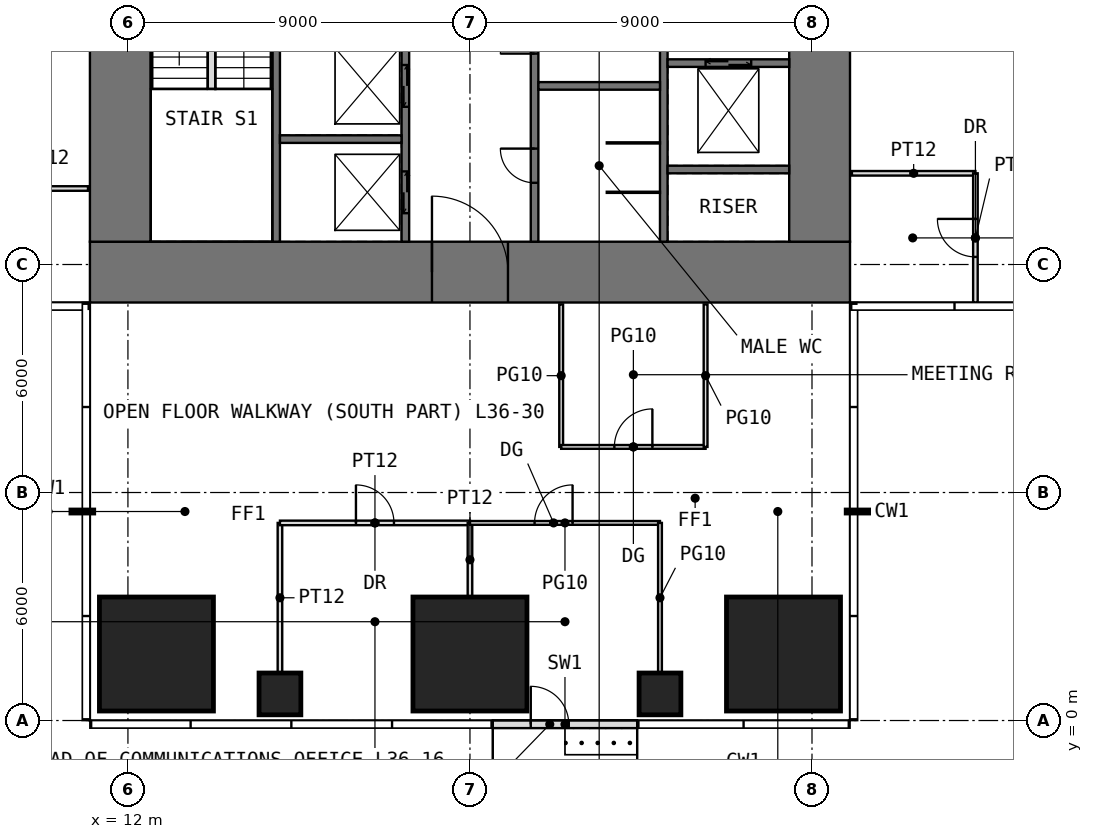
"""IFC4 building model, lengths in metres.
Left out: names, types, materials, properties, quantities, classifications, styles, units other than length and angle.
Written with IfcOpenShell. Run it as: python <this file> out.ifc"""

import sys

from ifc_helpers import new_model, si_unit, direction, frame, frame_2d, origin, origin_2d, place, context, subcontext, project, spatial, rectangle, extrude, element, fill, save


model = new_model("IFC4")
c1 = context("Model", 3, precision=1e-05, world=origin(), true_north=direction((0.0, 1.0)))
c2 = subcontext(c1, "Body", "Model", "MODEL_VIEW")
j1 = project(units=[si_unit("LENGTHUNIT", "METRE"), si_unit("PLANEANGLEUNIT", "RADIAN")], contexts=[c1])
p1 = place(None, origin())
s1 = spatial("IfcSite", under=j1, at=p1, CompositionType="ELEMENT")
p2 = place(p1, origin())
s2 = spatial("IfcBuilding", under=s1, at=p2, CompositionType="ELEMENT")
p3 = place(p2, frame((0.0, 0.0, 152.5)))
s3 = spatial("IfcBuildingStorey", under=s2, at=p3, CompositionType="ELEMENT", Elevation=152.5)
p4 = place(p3, frame((12.75, 1.75, 0.0), z_axis=(0.0, 0.0, 1.0), x_axis=(1.0, 0.0, 0.0)))
e1 = element("IfcColumn", 1, at=p4, inside=s3, PredefinedType="COLUMN", context=c2, shape_type="SweptSolid", body=[
    extrude(rectangle(XDim=3.0, YDim=3.0, at=origin_2d()), origin(), (0.0, 0.0, 1.0), 4.0),
])
p5 = place(p3, frame((16.0, 0.7, 0.0), z_axis=(0.0, 0.0, 1.0), x_axis=(1.0, 0.0, 0.0)))
e2 = element("IfcColumn", 2, at=p5, inside=s3, PredefinedType="COLUMN", context=c2, shape_type="SweptSolid", body=[
    extrude(rectangle(XDim=1.1, YDim=1.1, at=origin_2d()), origin(), (0.0, 0.0, 1.0), 4.0),
])
p6 = place(p3, frame((21.0, 1.75, 0.0), z_axis=(0.0, 0.0, 1.0), x_axis=(1.0, 0.0, 0.0)))
e3 = element("IfcColumn", 3, at=p6, inside=s3, PredefinedType="COLUMN", context=c2, shape_type="SweptSolid", body=[
    extrude(rectangle(XDim=3.0, YDim=3.0, at=origin_2d()), origin(), (0.0, 0.0, 1.0), 4.0),
])
p7 = place(p3, frame((26.0, 0.7, 0.0), z_axis=(0.0, 0.0, 1.0), x_axis=(1.0, 0.0, 0.0)))
e4 = element("IfcColumn", 4, at=p7, inside=s3, PredefinedType="COLUMN", context=c2, shape_type="SweptSolid", body=[
    extrude(rectangle(XDim=1.1, YDim=1.1, at=origin_2d()), origin(), (0.0, 0.0, 1.0), 4.0),
])
p8 = place(p3, frame((29.25, 1.75, 0.0), z_axis=(0.0, 0.0, 1.0), x_axis=(1.0, 0.0, 0.0)))
e5 = element("IfcColumn", 5, at=p8, inside=s3, PredefinedType="COLUMN", context=c2, shape_type="SweptSolid", body=[
    extrude(rectangle(XDim=3.0, YDim=3.0, at=origin_2d()), origin(), (0.0, 0.0, 1.0), 4.0),
])
p9 = place(p3, frame((21.6, -0.1, 0.0), z_axis=(0.0, 0.0, 1.0), x_axis=(1.0, 0.0, 0.0)))
e6 = element("IfcWall", 6, at=p9, inside=s3, PredefinedType="USERDEFINED", context=c2, shape_type="SweptSolid", body=[
    extrude(rectangle(XDim=3.8, YDim=0.2, at=frame_2d((1.9, 0.0))), origin(), (0.0, 0.0, 1.0), 3.75),
])
p10 = place(p9, frame((1.0, 0.0, 0.0)))
e7 = element("IfcOpeningElement", 7, at=p10, cuts=e6, PredefinedType="OPENING", context=c2, shape_type="SweptSolid", body=[
    extrude(rectangle(XDim=1.0, YDim=2.4, at=frame_2d((0.5, 1.2))), frame((0.0, 0.11, 0.0), z_axis=(0.0, -1.0, 0.0), x_axis=(1.0, 0.0, 0.0)), (0.0, 0.0, 1.0), 0.22),
])
p11 = place(p3, frame((11.0, 11.8, -0.05), z_axis=(0.0, 0.0, 1.0), x_axis=(1.0, 0.0, 0.0)))
e8 = element("IfcWall", 8, at=p11, inside=s3, PredefinedType="SHEAR", context=c2, shape_type="SweptSolid", body=[
    extrude(rectangle(XDim=20.0, YDim=1.6, at=frame_2d((10.0, 0.0))), origin(), (0.0, 0.0, 1.0), 4.0),
])
p12 = place(p11, frame((9.0, 0.0, 0.05)))
e9 = element("IfcOpeningElement", 9, at=p12, cuts=e8, PredefinedType="OPENING", context=c2, shape_type="SweptSolid", body=[
    extrude(rectangle(XDim=2.0, YDim=2.2, at=frame_2d((1.0, 1.1))), frame((0.0, 0.81, 0.0), z_axis=(0.0, -1.0, 0.0), x_axis=(1.0, 0.0, 0.0)), (0.0, 0.0, 1.0), 1.62),
])
p13 = place(p3, frame((11.8, 12.6, -0.05), z_axis=(0.0, 0.0, 1.0), x_axis=(0.0, 1.0, 0.0)))
e10 = element("IfcWall", 10, at=p13, inside=s3, PredefinedType="SHEAR", context=c2, shape_type="SweptSolid", body=[
    extrude(rectangle(XDim=16.8, YDim=1.6, at=frame_2d((8.4, 0.0))), origin(), (0.0, 0.0, 1.0), 4.0),
])
p14 = place(p13, frame((9.9, 0.0, 0.05)))
e11 = element("IfcOpeningElement", 11, at=p14, cuts=e10, PredefinedType="OPENING", context=c2, shape_type="SweptSolid", body=[
    extrude(rectangle(XDim=1.0, YDim=2.2, at=frame_2d((0.5, 1.1))), frame((0.0, 0.81, 0.0), z_axis=(0.0, -1.0, 0.0), x_axis=(1.0, 0.0, 0.0)), (0.0, 0.0, 1.0), 1.62),
])
p15 = place(p3, frame((30.2, 12.6, -0.05), z_axis=(0.0, 0.0, 1.0), x_axis=(0.0, 1.0, 0.0)))
e12 = element("IfcWall", 12, at=p15, inside=s3, PredefinedType="SHEAR", context=c2, shape_type="SweptSolid", body=[
    extrude(rectangle(XDim=16.8, YDim=1.6, at=frame_2d((8.4, 0.0))), origin(), (0.0, 0.0, 1.0), 4.0),
])
p16 = place(p15, frame((5.9, 0.0, 0.05)))
e13 = element("IfcOpeningElement", 13, at=p16, cuts=e12, PredefinedType="OPENING", context=c2, shape_type="SweptSolid", body=[
    extrude(rectangle(XDim=1.0, YDim=2.2, at=frame_2d((0.5, 1.1))), frame((0.0, 0.81, 0.0), z_axis=(0.0, -1.0, 0.0), x_axis=(1.0, 0.0, 0.0)), (0.0, 0.0, 1.0), 1.62),
])
p17 = place(p3, frame((15.9, 12.6, -0.05), z_axis=(0.0, 0.0, 1.0), x_axis=(0.0, 1.0, 0.0)))
e14 = element("IfcWall", 14, at=p17, inside=s3, PredefinedType="SHEAR", context=c2, shape_type="SweptSolid", body=[
    extrude(rectangle(XDim=16.8, YDim=0.2, at=frame_2d((8.4, 0.0))), origin(), (0.0, 0.0, 1.0), 4.0),
])
p18 = place(p17, frame((8.9, 0.0, 0.05)))
e15 = element("IfcOpeningElement", 15, at=p18, cuts=e14, PredefinedType="OPENING", context=c2, shape_type="SweptSolid", body=[
    extrude(rectangle(XDim=1.0, YDim=2.2, at=frame_2d((0.5, 1.1))), frame((0.0, 0.11, 0.0), z_axis=(0.0, -1.0, 0.0), x_axis=(1.0, 0.0, 0.0)), (0.0, 0.0, 1.0), 0.22),
])
p19 = place(p3, frame((19.3, 12.6, -0.05), z_axis=(0.0, 0.0, 1.0), x_axis=(0.0, 1.0, 0.0)))
e16 = element("IfcWall", 16, at=p19, inside=s3, PredefinedType="SHEAR", context=c2, shape_type="SweptSolid", body=[
    extrude(rectangle(XDim=16.8, YDim=0.2, at=frame_2d((8.4, 0.0))), origin(), (0.0, 0.0, 1.0), 4.0),
])
p20 = place(p19, frame((8.7, 0.0, 0.05)))
e17 = element("IfcOpeningElement", 17, at=p20, cuts=e16, PredefinedType="OPENING", context=c2, shape_type="SweptSolid", body=[
    extrude(rectangle(XDim=1.0, YDim=2.2, at=frame_2d((0.5, 1.1))), frame((0.0, 0.11, 0.0), z_axis=(0.0, -1.0, 0.0), x_axis=(1.0, 0.0, 0.0)), (0.0, 0.0, 1.0), 0.22),
])
p21 = place(p19, frame((10.85, 0.0, 0.05)))
e18 = element("IfcOpeningElement", 18, at=p21, cuts=e16, PredefinedType="OPENING", context=c2, shape_type="SweptSolid", body=[
    extrude(rectangle(XDim=0.9, YDim=2.2, at=frame_2d((0.45, 1.1))), frame((0.0, 0.11, 0.0), z_axis=(0.0, -1.0, 0.0), x_axis=(1.0, 0.0, 0.0)), (0.0, 0.0, 1.0), 0.22),
])
p22 = place(p19, frame((13.3, 0.0, 0.05)))
e19 = element("IfcOpeningElement", 19, at=p22, cuts=e16, PredefinedType="OPENING", context=c2, shape_type="SweptSolid", body=[
    extrude(rectangle(XDim=1.0, YDim=2.2, at=frame_2d((0.5, 1.1))), frame((0.0, 0.11, 0.0), z_axis=(0.0, -1.0, 0.0), x_axis=(1.0, 0.0, 0.0)), (0.0, 0.0, 1.0), 0.22),
])
p23 = place(p19, frame((15.55, 0.0, 0.05)))
e20 = element("IfcOpeningElement", 20, at=p23, cuts=e16, PredefinedType="OPENING", context=c2, shape_type="SweptSolid", body=[
    extrude(rectangle(XDim=0.9, YDim=2.2, at=frame_2d((0.45, 1.1))), frame((0.0, 0.11, 0.0), z_axis=(0.0, -1.0, 0.0), x_axis=(1.0, 0.0, 0.0)), (0.0, 0.0, 1.0), 0.22),
])
p24 = place(p19, frame((0.75, 0.0, 0.05)))
e21 = element("IfcOpeningElement", 21, at=p24, cuts=e16, PredefinedType="OPENING", context=c2, shape_type="SweptSolid", body=[
    extrude(rectangle(XDim=1.1, YDim=2.2, at=frame_2d((0.55, 1.1))), frame((0.0, 0.11, 0.0), z_axis=(0.0, -1.0, 0.0), x_axis=(1.0, 0.0, 0.0)), (0.0, 0.0, 1.0), 0.22),
])
p25 = place(p19, frame((3.55, 0.0, 0.05)))
e22 = element("IfcOpeningElement", 22, at=p25, cuts=e16, PredefinedType="OPENING", context=c2, shape_type="SweptSolid", body=[
    extrude(rectangle(XDim=1.1, YDim=2.2, at=frame_2d((0.55, 1.1))), frame((0.0, 0.11, 0.0), z_axis=(0.0, -1.0, 0.0), x_axis=(1.0, 0.0, 0.0)), (0.0, 0.0, 1.0), 0.22),
])
p26 = place(p19, frame((6.35, 0.0, 0.05)))
e23 = element("IfcOpeningElement", 23, at=p26, cuts=e16, PredefinedType="OPENING", context=c2, shape_type="SweptSolid", body=[
    extrude(rectangle(XDim=1.1, YDim=2.2, at=frame_2d((0.55, 1.1))), frame((0.0, 0.11, 0.0), z_axis=(0.0, -1.0, 0.0), x_axis=(1.0, 0.0, 0.0)), (0.0, 0.0, 1.0), 0.22),
])
p27 = place(p3, frame((22.7, 12.6, -0.05), z_axis=(0.0, 0.0, 1.0), x_axis=(0.0, 1.0, 0.0)))
e24 = element("IfcWall", 24, at=p27, inside=s3, PredefinedType="SHEAR", context=c2, shape_type="SweptSolid", body=[
    extrude(rectangle(XDim=16.8, YDim=0.2, at=frame_2d((8.4, 0.0))), origin(), (0.0, 0.0, 1.0), 4.0),
])
p28 = place(p27, frame((7.1, 0.0, 0.05)))
e25 = element("IfcOpeningElement", 25, at=p28, cuts=e24, PredefinedType="OPENING", context=c2, shape_type="SweptSolid", body=[
    extrude(rectangle(XDim=1.0, YDim=2.2, at=frame_2d((0.5, 1.1))), frame((0.0, 0.11, 0.0), z_axis=(0.0, -1.0, 0.0), x_axis=(1.0, 0.0, 0.0)), (0.0, 0.0, 1.0), 0.22),
])
p29 = place(p27, frame((1.55, 0.0, 0.05)))
e26 = element("IfcOpeningElement", 26, at=p29, cuts=e24, PredefinedType="OPENING", context=c2, shape_type="SweptSolid", body=[
    extrude(rectangle(XDim=0.9, YDim=2.2, at=frame_2d((0.45, 1.1))), frame((0.0, 0.11, 0.0), z_axis=(0.0, -1.0, 0.0), x_axis=(1.0, 0.0, 0.0)), (0.0, 0.0, 1.0), 0.22),
])
p30 = place(p27, frame((4.95, 0.0, 0.05)))
e27 = element("IfcOpeningElement", 27, at=p30, cuts=e24, PredefinedType="OPENING", context=c2, shape_type="SweptSolid", body=[
    extrude(rectangle(XDim=0.9, YDim=2.2, at=frame_2d((0.45, 1.1))), frame((0.0, 0.11, 0.0), z_axis=(0.0, -1.0, 0.0), x_axis=(1.0, 0.0, 0.0)), (0.0, 0.0, 1.0), 0.22),
])
p31 = place(p27, frame((9.4, 0.0, 0.05)))
e28 = element("IfcOpeningElement", 28, at=p31, cuts=e24, PredefinedType="OPENING", context=c2, shape_type="SweptSolid", body=[
    extrude(rectangle(XDim=1.0, YDim=2.2, at=frame_2d((0.5, 1.1))), frame((0.0, 0.11, 0.0), z_axis=(0.0, -1.0, 0.0), x_axis=(1.0, 0.0, 0.0)), (0.0, 0.0, 1.0), 0.22),
])
p32 = place(p3, frame((26.1, 12.6, -0.05), z_axis=(0.0, 0.0, 1.0), x_axis=(0.0, 1.0, 0.0)))
e29 = element("IfcWall", 29, at=p32, inside=s3, PredefinedType="SHEAR", context=c2, shape_type="SweptSolid", body=[
    extrude(rectangle(XDim=16.8, YDim=0.2, at=frame_2d((8.4, 0.0))), origin(), (0.0, 0.0, 1.0), 4.0),
])
p33 = place(p32, frame((6.9, 0.0, 0.05)))
e30 = element("IfcOpeningElement", 30, at=p33, cuts=e29, PredefinedType="OPENING", context=c2, shape_type="SweptSolid", body=[
    extrude(rectangle(XDim=1.0, YDim=2.2, at=frame_2d((0.5, 1.1))), frame((0.0, 0.11, 0.0), z_axis=(0.0, -1.0, 0.0), x_axis=(1.0, 0.0, 0.0)), (0.0, 0.0, 1.0), 0.22),
])
for number, where, z_axis, x_axis in (
    (31, (16.0, 15.3, -0.05), (0.0, 0.0, 1.0), (1.0, 0.0, 0.0)),
    (32, (22.8, 16.7, -0.05), (0.0, 0.0, 1.0), (1.0, 0.0, 0.0)),
    (33, (26.2, 14.5, -0.05), (0.0, 0.0, 1.0), (1.0, 0.0, 0.0)),
):
    element("IfcWall", number, at=place(p3, frame(where, z_axis=z_axis, x_axis=x_axis)), inside=s3, PredefinedType="SHEAR", context=c2, shape_type="SweptSolid", body=[
        extrude(rectangle(XDim=3.2, YDim=0.2, at=frame_2d((1.6, 0.0))), origin(), (0.0, 0.0, 1.0), 4.0),
    ])
p34 = place(p3, frame((26.2, 17.3, -0.05), z_axis=(0.0, 0.0, 1.0), x_axis=(1.0, 0.0, 0.0)))
e34 = element("IfcWall", 34, at=p34, inside=s3, PredefinedType="SHEAR", context=c2, shape_type="SweptSolid", body=[
    extrude(rectangle(XDim=3.2, YDim=0.2, at=frame_2d((1.6, 0.0))), origin(), (0.0, 0.0, 1.0), 4.0),
])
p35 = place(p34, frame((1.0, 0.0, 0.05)))
e35 = element("IfcOpeningElement", 35, at=p35, cuts=e34, PredefinedType="OPENING", context=c2, shape_type="SweptSolid", body=[
    extrude(rectangle(XDim=1.2, YDim=2.2, at=frame_2d((0.6, 1.1))), frame((0.0, 0.11, 0.0), z_axis=(0.0, -1.0, 0.0), x_axis=(1.0, 0.0, 0.0)), (0.0, 0.0, 1.0), 0.22),
])
for number, where, z_axis, x_axis in (
    (36, (24.6, 13.9, 0.0), (0.0, 0.0, 1.0), (1.0, 0.0, 0.0)),
    (37, (24.6, 15.2, 0.0), (0.0, 0.0, 1.0), (1.0, 0.0, 0.0)),
):
    element("IfcWall", number, at=place(p3, frame(where, z_axis=z_axis, x_axis=x_axis)), inside=s3, PredefinedType="PARTITIONING", context=c2, shape_type="SweptSolid", body=[
        extrude(rectangle(XDim=1.4, YDim=0.03, at=frame_2d((0.7, 0.0))), origin(), (0.0, 0.0, 1.0), 3.75),
    ])
p36 = place(p3, frame((7.2, 14.0, 0.0), z_axis=(0.0, 0.0, 1.0), x_axis=(1.0, 0.0, 0.0)))
e38 = element("IfcWall", 38, at=p36, inside=s3, PredefinedType="PARTITIONING", context=c2, shape_type="SweptSolid", body=[
    extrude(rectangle(XDim=3.75, YDim=0.12, at=frame_2d((1.875, 0.0))), origin(), (0.0, 0.0, 1.0), 3.75),
])
p37 = place(p3, frame((16.0, 1.26, 0.0), z_axis=(0.0, 0.0, 1.0), x_axis=(0.0, 1.0, 0.0)))
e39 = element("IfcWall", 39, at=p37, inside=s3, PredefinedType="PARTITIONING", context=c2, shape_type="SweptSolid", body=[
    extrude(rectangle(XDim=3.94, YDim=0.12, at=frame_2d((1.97, 0.0))), origin(), (0.0, 0.0, 1.0), 3.75),
])
p38 = place(p3, frame((16.0, 5.2, 0.0), z_axis=(0.0, 0.0, 1.0), x_axis=(1.0, 0.0, 0.0)))
e40 = element("IfcWall", 40, at=p38, inside=s3, PredefinedType="PARTITIONING", context=c2, shape_type="SweptSolid", body=[
    extrude(rectangle(XDim=5.0, YDim=0.12, at=frame_2d((2.5, 0.0))), origin(), (0.0, 0.0, 1.0), 3.75),
])
p39 = place(p38, frame((2.0, 0.0, 0.0)))
e41 = element("IfcOpeningElement", 41, at=p39, cuts=e40, PredefinedType="OPENING", context=c2, shape_type="SweptSolid", body=[
    extrude(rectangle(XDim=1.0, YDim=2.2, at=frame_2d((0.5, 1.1))), frame((0.0, 0.07, 0.0), z_axis=(0.0, -1.0, 0.0), x_axis=(1.0, 0.0, 0.0)), (0.0, 0.0, 1.0), 0.14),
])
p40 = place(p3, frame((21.0, 3.26, 0.0), z_axis=(0.0, 0.0, 1.0), x_axis=(0.0, 1.0, 0.0)))
e42 = element("IfcWall", 42, at=p40, inside=s3, PredefinedType="PARTITIONING", context=c2, shape_type="SweptSolid", body=[
    extrude(rectangle(XDim=1.94, YDim=0.12, at=frame_2d((0.97, 0.0))), origin(), (0.0, 0.0, 1.0), 3.75),
])
p41 = place(p3, frame((21.0, 5.2, 0.0), z_axis=(0.0, 0.0, 1.0), x_axis=(1.0, 0.0, 0.0)))
e43 = element("IfcWall", 43, at=p41, inside=s3, PredefinedType="PARTITIONING", context=c2, shape_type="SweptSolid", body=[
    extrude(rectangle(XDim=5.0, YDim=0.1, at=frame_2d((2.5, 0.0))), origin(), (0.0, 0.0, 1.0), 3.75),
])
p42 = place(p41, frame((1.7, 0.0, 0.0)))
e44 = element("IfcOpeningElement", 44, at=p42, cuts=e43, PredefinedType="OPENING", context=c2, shape_type="SweptSolid", body=[
    extrude(rectangle(XDim=1.0, YDim=2.4, at=frame_2d((0.5, 1.2))), frame((0.0, 0.06, 0.0), z_axis=(0.0, -1.0, 0.0), x_axis=(1.0, 0.0, 0.0)), (0.0, 0.0, 1.0), 0.12),
])
p43 = place(p3, frame((23.4, 7.2, 0.0), z_axis=(0.0, 0.0, 1.0), x_axis=(0.0, 1.0, 0.0)))
e45 = element("IfcWall", 45, at=p43, inside=s3, PredefinedType="PARTITIONING", context=c2, shape_type="SweptSolid", body=[
    extrude(rectangle(XDim=3.75, YDim=0.1, at=frame_2d((1.875, 0.0))), origin(), (0.0, 0.0, 1.0), 3.75),
])
p44 = place(p3, frame((23.4, 7.2, 0.0), z_axis=(0.0, 0.0, 1.0), x_axis=(1.0, 0.0, 0.0)))
e46 = element("IfcWall", 46, at=p44, inside=s3, PredefinedType="PARTITIONING", context=c2, shape_type="SweptSolid", body=[
    extrude(rectangle(XDim=3.8, YDim=0.1, at=frame_2d((1.9, 0.0))), origin(), (0.0, 0.0, 1.0), 3.75),
])
p45 = place(p44, frame((1.4, 0.0, 0.0)))
e47 = element("IfcOpeningElement", 47, at=p45, cuts=e46, PredefinedType="OPENING", context=c2, shape_type="SweptSolid", body=[
    extrude(rectangle(XDim=1.0, YDim=2.4, at=frame_2d((0.5, 1.2))), frame((0.0, 0.06, 0.0), z_axis=(0.0, -1.0, 0.0), x_axis=(1.0, 0.0, 0.0)), (0.0, 0.0, 1.0), 0.12),
])
p46 = place(p3, frame((26.0, 1.26, 0.0), z_axis=(0.0, 0.0, 1.0), x_axis=(0.0, 1.0, 0.0)))
e48 = element("IfcWall", 48, at=p46, inside=s3, PredefinedType="PARTITIONING", context=c2, shape_type="SweptSolid", body=[
    extrude(rectangle(XDim=3.94, YDim=0.1, at=frame_2d((1.97, 0.0))), origin(), (0.0, 0.0, 1.0), 3.75),
])
p47 = place(p3, frame((27.2, 7.2, 0.0), z_axis=(0.0, 0.0, 1.0), x_axis=(0.0, 1.0, 0.0)))
e49 = element("IfcWall", 49, at=p47, inside=s3, PredefinedType="PARTITIONING", context=c2, shape_type="SweptSolid", body=[
    extrude(rectangle(XDim=3.75, YDim=0.1, at=frame_2d((1.875, 0.0))), origin(), (0.0, 0.0, 1.0), 3.75),
])
p48 = place(p3, frame((31.05, 14.4, 0.0), z_axis=(0.0, 0.0, 1.0), x_axis=(1.0, 0.0, 0.0)))
e50 = element("IfcWall", 50, at=p48, inside=s3, PredefinedType="PARTITIONING", context=c2, shape_type="SweptSolid", body=[
    extrude(rectangle(XDim=3.25, YDim=0.12, at=frame_2d((1.625, 0.0))), origin(), (0.0, 0.0, 1.0), 3.75),
])
p49 = place(p3, frame((34.3, 11.0, 0.0), z_axis=(0.0, 0.0, 1.0), x_axis=(0.0, 1.0, 0.0)))
e51 = element("IfcWall", 51, at=p49, inside=s3, PredefinedType="PARTITIONING", context=c2, shape_type="SweptSolid", body=[
    extrude(rectangle(XDim=3.4, YDim=0.12, at=frame_2d((1.7, 0.0))), origin(), (0.0, 0.0, 1.0), 3.75),
])
p50 = place(p49, frame((1.2, 0.0, 0.0)))
e52 = element("IfcOpeningElement", 52, at=p50, cuts=e51, PredefinedType="OPENING", context=c2, shape_type="SweptSolid", body=[
    extrude(rectangle(XDim=1.0, YDim=2.2, at=frame_2d((0.5, 1.1))), frame((0.0, 0.07, 0.0), z_axis=(0.0, -1.0, 0.0), x_axis=(1.0, 0.0, 0.0)), (0.0, 0.0, 1.0), 0.14),
])
p51 = place(p3, frame((14.2, 16.62, 0.0), z_axis=(0.0, 0.0, 1.0), x_axis=(0.0, 1.0, 0.0)))
e53 = element("IfcWall", 53, at=p51, inside=s3, PredefinedType="PARTITIONING", context=c2, shape_type="SweptSolid", body=[
    extrude(rectangle(XDim=3.08, YDim=0.2, at=frame_2d((1.54, 0.0))), origin(), (0.0, 0.0, 1.0), 4.0),
])
p52 = place(p10, origin())
e54 = element("IfcDoor", 54, at=p52, inside=s3, OperationType="SINGLE_SWING_LEFT", PredefinedType="DOOR", context=c2, shape_type="SweptSolid", body=[
    extrude(rectangle(XDim=1.0, YDim=2.4, at=frame_2d((0.5, 1.2))), frame((0.0, 0.025, 0.0), z_axis=(0.0, -1.0, 0.0), x_axis=(1.0, 0.0, 0.0)), (0.0, 0.0, 1.0), 0.05),
])
fill(e7, e54)
p53 = place(p12, origin())
e55 = element("IfcDoor", 55, at=p53, inside=s3, OperationType="DOUBLE_DOOR_SINGLE_SWING", PredefinedType="DOOR", context=c2, shape_type="SweptSolid", body=[
    extrude(rectangle(XDim=2.0, YDim=2.2, at=frame_2d((1.0, 1.1))), frame((0.0, 0.025, 0.0), z_axis=(0.0, -1.0, 0.0), x_axis=(1.0, 0.0, 0.0)), (0.0, 0.0, 1.0), 0.05),
])
fill(e9, e55)
p54 = place(p29, origin())
e56 = element("IfcDoor", 56, at=p54, inside=s3, OperationType="SINGLE_SWING_RIGHT", PredefinedType="DOOR", context=c2, shape_type="SweptSolid", body=[
    extrude(rectangle(XDim=0.9, YDim=2.2, at=frame_2d((0.45, 1.1))), frame((0.0, 0.025, 0.0), z_axis=(0.0, -1.0, 0.0), x_axis=(1.0, 0.0, 0.0)), (0.0, 0.0, 1.0), 0.05),
])
fill(e26, e56)
p55 = place(p30, origin())
e57 = element("IfcDoor", 57, at=p55, inside=s3, OperationType="SINGLE_SWING_LEFT", PredefinedType="DOOR", context=c2, shape_type="SweptSolid", body=[
    extrude(rectangle(XDim=0.9, YDim=2.2, at=frame_2d((0.45, 1.1))), frame((0.0, 0.025, 0.0), z_axis=(0.0, -1.0, 0.0), x_axis=(1.0, 0.0, 0.0)), (0.0, 0.0, 1.0), 0.05),
])
fill(e27, e57)
p56 = place(p45, origin())
e58 = element("IfcDoor", 58, at=p56, inside=s3, OperationType="SINGLE_SWING_RIGHT", PredefinedType="DOOR", context=c2, shape_type="SweptSolid", body=[
    extrude(rectangle(XDim=1.0, YDim=2.4, at=frame_2d((0.5, 1.2))), frame((0.0, 0.025, 0.0), z_axis=(0.0, -1.0, 0.0), x_axis=(1.0, 0.0, 0.0)), (0.0, 0.0, 1.0), 0.05),
])
fill(e47, e58)
p57 = place(p39, origin())
e59 = element("IfcDoor", 59, at=p57, inside=s3, OperationType="SINGLE_SWING_LEFT", PredefinedType="DOOR", context=c2, shape_type="SweptSolid", body=[
    extrude(rectangle(XDim=1.0, YDim=2.2, at=frame_2d((0.5, 1.1))), frame((0.0, 0.025, 0.0), z_axis=(0.0, -1.0, 0.0), x_axis=(1.0, 0.0, 0.0)), (0.0, 0.0, 1.0), 0.05),
])
fill(e41, e59)
p58 = place(p42, origin())
e60 = element("IfcDoor", 60, at=p58, inside=s3, OperationType="SINGLE_SWING_RIGHT", PredefinedType="DOOR", context=c2, shape_type="SweptSolid", body=[
    extrude(rectangle(XDim=1.0, YDim=2.4, at=frame_2d((0.5, 1.2))), frame((0.0, 0.025, 0.0), z_axis=(0.0, -1.0, 0.0), x_axis=(1.0, 0.0, 0.0)), (0.0, 0.0, 1.0), 0.05),
])
fill(e44, e60)
p59 = place(p50, origin())
e61 = element("IfcDoor", 61, at=p59, inside=s3, OperationType="SINGLE_SWING_RIGHT", PredefinedType="DOOR", context=c2, shape_type="SweptSolid", body=[
    extrude(rectangle(XDim=1.0, YDim=2.2, at=frame_2d((0.5, 1.1))), frame((0.0, 0.025, 0.0), z_axis=(0.0, -1.0, 0.0), x_axis=(1.0, 0.0, 0.0)), (0.0, 0.0, 1.0), 0.05),
])
fill(e52, e61)
p60 = place(p24, origin())
e62 = element("IfcDoor", 62, at=p60, inside=s3, OperationType="DOUBLE_DOOR_SLIDING", PredefinedType="DOOR", context=c2, shape_type="SweptSolid", body=[
    extrude(rectangle(XDim=1.1, YDim=2.2, at=frame_2d((0.55, 1.1))), frame((0.0, 0.025, 0.0), z_axis=(0.0, -1.0, 0.0), x_axis=(1.0, 0.0, 0.0)), (0.0, 0.0, 1.0), 0.05),
])
fill(e21, e62)
p61 = place(p25, origin())
e63 = element("IfcDoor", 63, at=p61, inside=s3, OperationType="DOUBLE_DOOR_SLIDING", PredefinedType="DOOR", context=c2, shape_type="SweptSolid", body=[
    extrude(rectangle(XDim=1.1, YDim=2.2, at=frame_2d((0.55, 1.1))), frame((0.0, 0.025, 0.0), z_axis=(0.0, -1.0, 0.0), x_axis=(1.0, 0.0, 0.0)), (0.0, 0.0, 1.0), 0.05),
])
fill(e22, e63)
p62 = place(p35, origin())
e64 = element("IfcDoor", 64, at=p62, inside=s3, OperationType="DOUBLE_DOOR_SLIDING", PredefinedType="DOOR", context=c2, shape_type="SweptSolid", body=[
    extrude(rectangle(XDim=1.2, YDim=2.2, at=frame_2d((0.6, 1.1))), frame((0.0, 0.025, 0.0), z_axis=(0.0, -1.0, 0.0), x_axis=(1.0, 0.0, 0.0)), (0.0, 0.0, 1.0), 0.05),
])
fill(e35, e64)
save(model, sys.argv[1])
